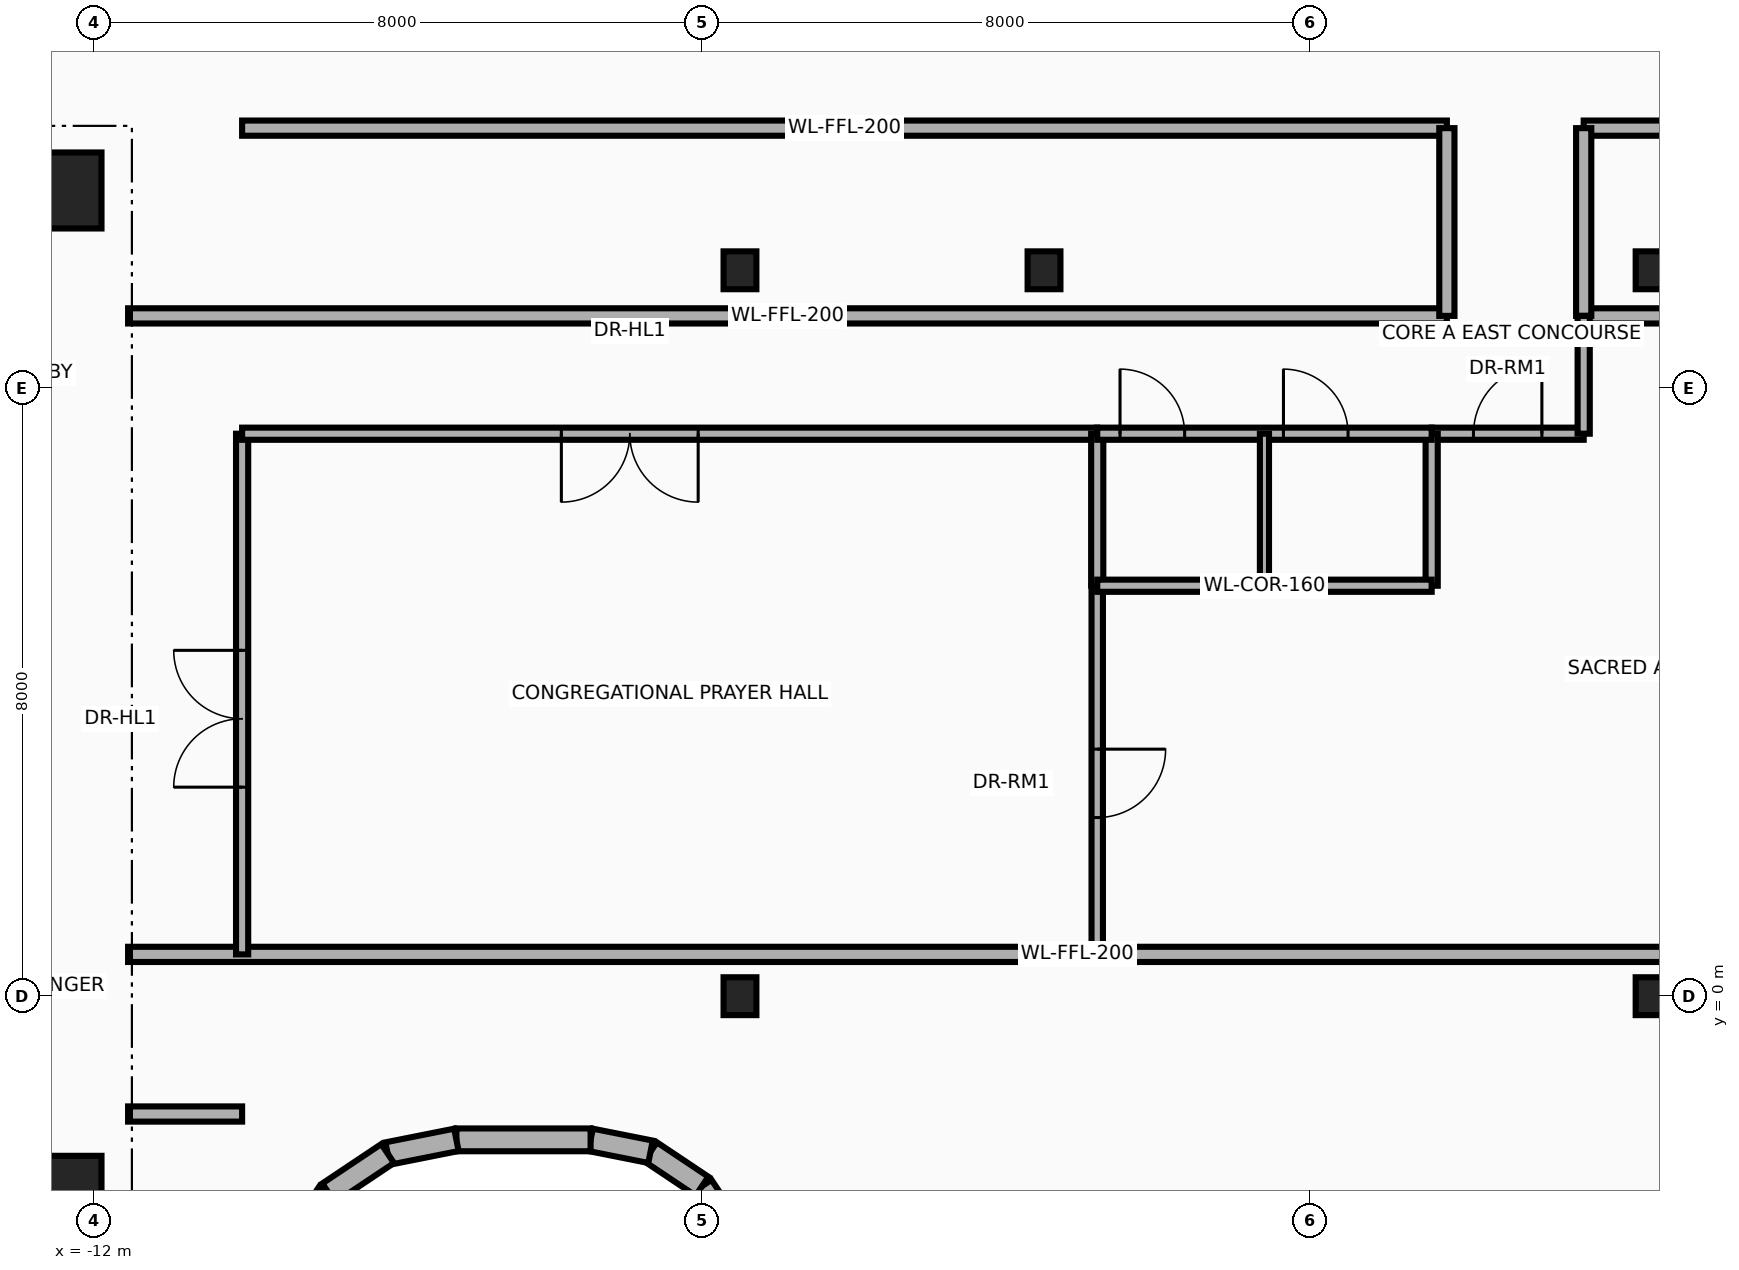
"""IFC4 building model, lengths in metres.
Left out: names, types, materials, properties, quantities, classifications, styles, units other than length and angle.
Written with IfcOpenShell. Run it as: python <this file> out.ifc"""

import sys

from ifc_helpers import new_model, si_unit, direction, frame, frame_2d, origin, origin_2d, place, context, subcontext, project, spatial, rectangle, i_section, extrude, source, transform, mapped, element, fill, save


model = new_model("IFC4")
c1 = context("Model", 3, precision=1e-05, world=origin(), true_north=direction((0.0, 1.0)))
c2 = subcontext(c1, "Body", "Model", "MODEL_VIEW")
j1 = project(units=[si_unit("LENGTHUNIT", "METRE"), si_unit("PLANEANGLEUNIT", "RADIAN")], contexts=[c1])
p1 = place(None, origin())
s1 = spatial("IfcSite", under=j1, at=p1, CompositionType="ELEMENT")
p2 = place(p1, origin())
s2 = spatial("IfcBuilding", under=s1, at=p2, CompositionType="ELEMENT")
p3 = place(p2, frame((0.0, 0.0, 172.3)))
s3 = spatial("IfcBuildingStorey", under=s2, at=p3, CompositionType="ELEMENT", Elevation=172.3)
p4 = place(p3, frame((-22.65, 10.8, 0.0), z_axis=(0.0, 0.0, 1.0), x_axis=(1.0, 0.0, 0.0)))
e1 = element("IfcWall", 1, at=p4, inside=s3, PredefinedType="SHEAR", context=c2, shape_type="SweptSolid", body=[
    extrude(rectangle(XDim=10.25, YDim=0.55, at=frame_2d((5.125, 0.0))), origin(), (0.0, 0.0, 1.0), 3.93),
])
m1 = source(origin(), c2, "Body", "SweptSolid", [
    extrude(rectangle(XDim=1.0, YDim=1.0, at=origin_2d()), origin(), (0.0, 0.0, 1.0), 4.25),
])
for number, where, z_axis, x_axis in (
    (2, (-12.4, -2.6, 0.0), (0.0, 0.0, 1.0), (1.0, 0.0, 0.0)),
    (3, (-12.4, 10.6, 0.0), (0.0, 0.0, 1.0), (1.0, 0.0, 0.0)),
):
    element("IfcColumn", number, at=place(p3, frame(where, z_axis=z_axis, x_axis=x_axis)), inside=s3, PredefinedType="COLUMN", context=c2, shape_type="MappedRepresentation", body=[
        mapped(m1, transform((0.0, 0.0, 0.0), x_axis=(1.0, 0.0, 0.0), y_axis=(0.0, 1.0, 0.0), z_axis=(0.0, 0.0, 1.0), scale=1.0)),
    ])
m2 = source(origin(), c2, "Body", "SweptSolid", [
    extrude(i_section(OverallWidth=0.432, OverallDepth=0.498, WebThickness=0.056, FlangeThickness=0.089, at=origin_2d()), origin(), (0.0, 0.0, 1.0), 4.25),
])
for number, where, z_axis, x_axis in (
    (4, (-3.5, 0.0, 0.0), (0.0, 0.0, 1.0), (1.0, 0.0, 0.0)),
    (5, (-3.5, 9.55, 0.0), (0.0, 0.0, 1.0), (1.0, 0.0, 0.0)),
    (6, (8.5, 0.0, 0.0), (0.0, 0.0, 1.0), (1.0, 0.0, 0.0)),
    (7, (8.5, 9.55, 0.0), (0.0, 0.0, 1.0), (1.0, 0.0, 0.0)),
    (8, (0.5, 9.55, 0.0), (0.0, 0.0, 1.0), (1.0, 0.0, 0.0)),
):
    element("IfcColumn", number, at=place(p3, frame(where, z_axis=z_axis, x_axis=x_axis)), inside=s3, PredefinedType="COLUMN", context=c2, shape_type="MappedRepresentation", body=[
        mapped(m2, transform((0.0, 0.0, 0.0), x_axis=(1.0, 0.0, 0.0), y_axis=(0.0, 1.0, 0.0), z_axis=(0.0, 0.0, 1.0), scale=1.0)),
    ])
p5 = place(p3, frame((8.977, -2.477, 0.0), z_axis=(0.0, 0.0, 1.0), x_axis=(-0.555776307766, -0.831331880615, 0.0)))
e9 = element("IfcWall", 9, at=p5, inside=s3, PredefinedType="SOLIDWALL", context=c2, shape_type="SweptSolid", body=[
    extrude(rectangle(XDim=0.785, YDim=0.3, at=frame_2d((0.393, 0.0))), origin(), (0.0, 0.0, 1.0), 2.915),
])
for number, where, z_axis, x_axis in (
    (10, (-3.547, -3.177, 0.0), (0.0, 0.0, 1.0), (-0.556, 0.831, 0.0)),
    (11, (-4.0, -2.5, 0.0), (0.0, 0.0, 1.0), (-0.831, 0.556, 0.0)),
):
    element("IfcWall", number, at=place(p3, frame(where, z_axis=z_axis, x_axis=x_axis)), inside=s3, PredefinedType="SOLIDWALL", context=c2, shape_type="SweptSolid", body=[
        extrude(rectangle(XDim=0.815, YDim=0.3, at=frame_2d((0.407, 0.0))), origin(), (0.0, 0.0, 1.0), 2.915),
    ])
p6 = place(p3, frame((-4.677, -2.047, 0.0), z_axis=(0.0, 0.0, 1.0), x_axis=(-0.980732291726, 0.195356525272, 0.0)))
e12 = element("IfcWall", 12, at=p6, inside=s3, PredefinedType="SOLIDWALL", context=c2, shape_type="SweptSolid", body=[
    extrude(rectangle(XDim=0.803, YDim=0.3, at=frame_2d((0.402, 0.0))), origin(), (0.0, 0.0, 1.0), 3.93),
])
p7 = place(p3, frame((-5.465, -1.89, 0.0), z_axis=(0.0, 0.0, 1.0), x_axis=(-1.0, 0.0, 0.0)))
e13 = element("IfcWall", 13, at=p7, inside=s3, PredefinedType="SOLIDWALL", context=c2, shape_type="SweptSolid", body=[
    extrude(rectangle(XDim=1.766, YDim=0.3, at=frame_2d((0.883, 0.0))), origin(), (0.0, 0.0, 1.0), 3.93),
])
p8 = place(p3, frame((-7.231, -1.89, 0.0), z_axis=(0.0, 0.0, 1.0), x_axis=(-0.980743190895, -0.195301801101, 0.0)))
e14 = element("IfcWall", 14, at=p8, inside=s3, PredefinedType="SOLIDWALL", context=c2, shape_type="SweptSolid", body=[
    extrude(rectangle(XDim=0.923, YDim=0.3, at=frame_2d((0.461, 0.0))), origin(), (0.0, 0.0, 1.0), 2.715),
])
p9 = place(p3, frame((-8.135, -2.07, 0.0), z_axis=(0.0, 0.0, 1.0), x_axis=(-0.831607331814, -0.555364065883, 0.0)))
e15 = element("IfcWall", 15, at=p9, inside=s3, PredefinedType="SOLIDWALL", context=c2, shape_type="SweptSolid", body=[
    extrude(rectangle(XDim=0.933, YDim=0.3, at=frame_2d((0.467, 0.0))), origin(), (0.0, 0.0, 1.0), 2.715),
])
p10 = place(p3, frame((-8.912, -2.588, 0.0), z_axis=(0.0, 0.0, 1.0), x_axis=(-0.555364065883, -0.831607331814, 0.0)))
e16 = element("IfcWall", 16, at=p10, inside=s3, PredefinedType="SOLIDWALL", context=c2, shape_type="SweptSolid", body=[
    extrude(rectangle(XDim=0.933, YDim=0.3, at=frame_2d((0.467, 0.0))), origin(), (0.0, 0.0, 1.0), 3.93),
])
p11 = place(p3, frame((-11.55, 0.55, 0.0), z_axis=(0.0, 0.0, 1.0), x_axis=(1.0, 0.0, 0.0)))
e17 = element("IfcWall", 17, at=p11, inside=s3, PredefinedType="PARTITIONING", context=c2, shape_type="SweptSolid", body=[
    extrude(rectangle(XDim=24.97, YDim=0.2, at=frame_2d((12.485, 0.0))), origin(), (0.0, 0.0, 1.0), 2.715),
])
p12 = place(p3, frame((-11.55, -1.55, 0.0), z_axis=(0.0, 0.0, 1.0), x_axis=(1.0, 0.0, 0.0)))
e18 = element("IfcWall", 18, at=p12, inside=s3, PredefinedType="PARTITIONING", context=c2, shape_type="SweptSolid", body=[
    extrude(rectangle(XDim=1.5, YDim=0.2, at=frame_2d((0.75, 0.0))), origin(), (0.0, 0.0, 1.0), 2.715),
])
p13 = place(p3, frame((-11.55, 8.95, 0.0), z_axis=(0.0, 0.0, 1.0), x_axis=(1.0, 0.0, 0.0)))
e19 = element("IfcWall", 19, at=p13, inside=s3, PredefinedType="PARTITIONING", context=c2, shape_type="SweptSolid", body=[
    extrude(rectangle(XDim=17.35, YDim=0.2, at=frame_2d((8.675, 0.0))), origin(), (0.0, 0.0, 1.0), 2.715),
])
p14 = place(p3, frame((7.6, 8.95, 0.0), z_axis=(0.0, 0.0, 1.0), x_axis=(1.0, 0.0, 0.0)))
e20 = element("IfcWall", 20, at=p14, inside=s3, PredefinedType="PARTITIONING", context=c2, shape_type="SweptSolid", body=[
    extrude(rectangle(XDim=5.82, YDim=0.2, at=frame_2d((2.91, 0.0))), origin(), (0.0, 0.0, 1.0), 2.715),
])
p15 = place(p3, frame((-10.05, 11.42, 0.0), z_axis=(0.0, 0.0, 1.0), x_axis=(1.0, 0.0, 0.0)))
e21 = element("IfcWall", 21, at=p15, inside=s3, PredefinedType="PARTITIONING", context=c2, shape_type="SweptSolid", body=[
    extrude(rectangle(XDim=15.85, YDim=0.2, at=frame_2d((7.925, 0.0))), origin(), (0.0, 0.0, 1.0), 2.915),
])
p16 = place(p3, frame((7.6, 11.42, 0.0), z_axis=(0.0, 0.0, 1.0), x_axis=(1.0, 0.0, 0.0)))
e22 = element("IfcWall", 22, at=p16, inside=s3, PredefinedType="PARTITIONING", context=c2, shape_type="SweptSolid", body=[
    extrude(rectangle(XDim=5.82, YDim=0.2, at=frame_2d((2.91, 0.0))), origin(), (0.0, 0.0, 1.0), 2.915),
])
for number, where, z_axis, x_axis in (
    (23, (5.8, 8.95, 0.0), (0.0, 0.0, 1.0), (0.0, 1.0, 0.0)),
    (24, (7.6, 8.95, 0.0), (0.0, 0.0, 1.0), (0.0, 1.0, 0.0)),
):
    element("IfcWall", number, at=place(p3, frame(where, z_axis=z_axis, x_axis=x_axis)), inside=s3, PredefinedType="PARTITIONING", context=c2, shape_type="SweptSolid", body=[
        extrude(rectangle(XDim=2.47, YDim=0.2, at=frame_2d((1.235, 0.0))), origin(), (0.0, 0.0, 1.0), 2.715),
    ])
p17 = place(p3, frame((-10.05, 0.55, 0.0), z_axis=(0.0, 0.0, 1.0), x_axis=(0.0, 1.0, 0.0)))
e25 = element("IfcWall", 25, at=p17, inside=s3, PredefinedType="PARTITIONING", context=c2, shape_type="SweptSolid", body=[
    extrude(rectangle(XDim=6.85, YDim=0.16, at=frame_2d((3.425, 0.0))), origin(), (0.0, 0.0, 1.0), 3.93),
])
p18 = place(p17, frame((2.2, 0.0, 0.0)))
e26 = element("IfcOpeningElement", 26, at=p18, cuts=e25, PredefinedType="OPENING", context=c2, shape_type="SweptSolid", body=[
    extrude(rectangle(XDim=1.8, YDim=2.15, at=frame_2d((0.9, 1.075))), frame((0.0, 0.095, 0.0), z_axis=(0.0, -1.0, 0.0), x_axis=(1.0, 0.0, 0.0)), (0.0, 0.0, 1.0), 0.19),
])
p19 = place(p3, frame((-10.05, 7.4, 0.0), z_axis=(0.0, 0.0, 1.0), x_axis=(1.0, 0.0, 0.0)))
e27 = element("IfcWall", 27, at=p19, inside=s3, PredefinedType="PARTITIONING", context=c2, shape_type="SweptSolid", body=[
    extrude(rectangle(XDim=11.25, YDim=0.16, at=frame_2d((5.625, 0.0))), origin(), (0.0, 0.0, 1.0), 2.915),
])
p20 = place(p19, frame((4.2, 0.0, 0.0)))
e28 = element("IfcOpeningElement", 28, at=p20, cuts=e27, PredefinedType="OPENING", context=c2, shape_type="SweptSolid", body=[
    extrude(rectangle(XDim=1.8, YDim=2.15, at=frame_2d((0.9, 1.075))), frame((0.0, 0.095, 0.0), z_axis=(0.0, -1.0, 0.0), x_axis=(1.0, 0.0, 0.0)), (0.0, 0.0, 1.0), 0.19),
])
p21 = place(p3, frame((5.6, 7.4, 0.0), z_axis=(0.0, 0.0, 1.0), x_axis=(1.0, 0.0, 0.0)))
e29 = element("IfcWall", 29, at=p21, inside=s3, PredefinedType="PARTITIONING", context=c2, shape_type="SweptSolid", body=[
    extrude(rectangle(XDim=2.0, YDim=0.16, at=frame_2d((1.0, 0.0))), origin(), (0.0, 0.0, 1.0), 3.93),
])
p22 = place(p21, frame((0.55, 0.0, 0.0)))
e30 = element("IfcOpeningElement", 30, at=p22, cuts=e29, PredefinedType="OPENING", context=c2, shape_type="SweptSolid", body=[
    extrude(rectangle(XDim=0.9, YDim=2.1, at=frame_2d((0.45, 1.05))), frame((0.0, 0.095, 0.0), z_axis=(0.0, -1.0, 0.0), x_axis=(1.0, 0.0, 0.0)), (0.0, 0.0, 1.0), 0.19),
])
p23 = place(p3, frame((7.6, 7.4, 0.0), z_axis=(0.0, 0.0, 1.0), x_axis=(0.0, 1.0, 0.0)))
e31 = element("IfcWall", 31, at=p23, inside=s3, PredefinedType="PARTITIONING", context=c2, shape_type="SweptSolid", body=[
    extrude(rectangle(XDim=1.55, YDim=0.16, at=frame_2d((0.775, 0.0))), origin(), (0.0, 0.0, 1.0), 2.715),
])
p24 = place(p3, frame((1.2, 0.55, 0.0), z_axis=(0.0, 0.0, 1.0), x_axis=(0.0, 1.0, 0.0)))
e32 = element("IfcWall", 32, at=p24, inside=s3, PredefinedType="PARTITIONING", context=c2, shape_type="SweptSolid", body=[
    extrude(rectangle(XDim=4.85, YDim=0.15, at=frame_2d((2.425, 0.0))), origin(), (0.0, 0.0, 1.0), 2.715),
])
p25 = place(p24, frame((1.8, 0.0, 0.0)))
e33 = element("IfcOpeningElement", 33, at=p25, cuts=e32, PredefinedType="OPENING", context=c2, shape_type="SweptSolid", body=[
    extrude(rectangle(XDim=0.9, YDim=2.1, at=frame_2d((0.45, 1.05))), frame((0.0, 0.09, 0.0), z_axis=(0.0, -1.0, 0.0), x_axis=(1.0, 0.0, 0.0)), (0.0, 0.0, 1.0), 0.18),
])
for number, where, z_axis, x_axis in (
    (34, (1.2, 5.4, 0.0), (0.0, 0.0, 1.0), (0.0, 1.0, 0.0)),
    (35, (5.6, 5.4, 0.0), (0.0, 0.0, 1.0), (0.0, 1.0, 0.0)),
):
    element("IfcWall", number, at=place(p3, frame(where, z_axis=z_axis, x_axis=x_axis)), inside=s3, PredefinedType="PARTITIONING", context=c2, shape_type="SweptSolid", body=[
        extrude(rectangle(XDim=2.0, YDim=0.16, at=frame_2d((1.0, 0.0))), origin(), (0.0, 0.0, 1.0), 3.93),
    ])
p26 = place(p3, frame((1.2, 5.4, 0.0), z_axis=(0.0, 0.0, 1.0), x_axis=(1.0, 0.0, 0.0)))
e36 = element("IfcWall", 36, at=p26, inside=s3, PredefinedType="PARTITIONING", context=c2, shape_type="SweptSolid", body=[
    extrude(rectangle(XDim=4.4, YDim=0.16, at=frame_2d((2.2, 0.0))), origin(), (0.0, 0.0, 1.0), 3.93),
])
p27 = place(p3, frame((1.2, 7.4, 0.0), z_axis=(0.0, 0.0, 1.0), x_axis=(1.0, 0.0, 0.0)))
e37 = element("IfcWall", 37, at=p27, inside=s3, PredefinedType="PARTITIONING", context=c2, shape_type="SweptSolid", body=[
    extrude(rectangle(XDim=4.4, YDim=0.16, at=frame_2d((2.2, 0.0))), origin(), (0.0, 0.0, 1.0), 3.93),
])
p28 = place(p27, frame((0.3, 0.0, 0.0)))
e38 = element("IfcOpeningElement", 38, at=p28, cuts=e37, PredefinedType="OPENING", context=c2, shape_type="SweptSolid", body=[
    extrude(rectangle(XDim=0.85, YDim=2.1, at=frame_2d((0.425, 1.05))), frame((0.0, 0.095, 0.0), z_axis=(0.0, -1.0, 0.0), x_axis=(1.0, 0.0, 0.0)), (0.0, 0.0, 1.0), 0.19),
])
p29 = place(p27, frame((2.45, 0.0, 0.0)))
e39 = element("IfcOpeningElement", 39, at=p29, cuts=e37, PredefinedType="OPENING", context=c2, shape_type="SweptSolid", body=[
    extrude(rectangle(XDim=0.85, YDim=2.1, at=frame_2d((0.425, 1.05))), frame((0.0, 0.095, 0.0), z_axis=(0.0, -1.0, 0.0), x_axis=(1.0, 0.0, 0.0)), (0.0, 0.0, 1.0), 0.19),
])
p30 = place(p3, frame((3.4, 5.4, 0.0), z_axis=(0.0, 0.0, 1.0), x_axis=(0.0, 1.0, 0.0)))
e40 = element("IfcWall", 40, at=p30, inside=s3, PredefinedType="PARTITIONING", context=c2, shape_type="SweptSolid", body=[
    extrude(rectangle(XDim=2.0, YDim=0.12, at=frame_2d((1.0, 0.0))), origin(), (0.0, 0.0, 1.0), 3.93),
])
p31 = place(p18, origin())
e41 = element("IfcDoor", 41, at=p31, inside=s3, OperationType="DOUBLE_DOOR_SINGLE_SWING", PredefinedType="DOOR", context=c2, shape_type="SweptSolid", body=[
    extrude(rectangle(XDim=1.8, YDim=2.15, at=frame_2d((0.9, 1.075))), frame((0.0, 0.025, 0.0), z_axis=(0.0, -1.0, 0.0), x_axis=(1.0, 0.0, 0.0)), (0.0, 0.0, 1.0), 0.05),
])
fill(e26, e41)
p32 = place(p20, frame((1.8, 0.0, 0.0), z_axis=(0.0, 0.0, 1.0), x_axis=(-1.0, 0.0, 0.0)))
e42 = element("IfcDoor", 42, at=p32, inside=s3, OperationType="DOUBLE_DOOR_SINGLE_SWING", PredefinedType="DOOR", context=c2, shape_type="SweptSolid", body=[
    extrude(rectangle(XDim=1.8, YDim=2.15, at=frame_2d((0.9, 1.075))), frame((0.0, 0.025, 0.0), z_axis=(0.0, -1.0, 0.0), x_axis=(1.0, 0.0, 0.0)), (0.0, 0.0, 1.0), 0.05),
])
fill(e28, e42)
p33 = place(p22, origin())
e43 = element("IfcDoor", 43, at=p33, inside=s3, OperationType="SINGLE_SWING_RIGHT", PredefinedType="DOOR", context=c2, shape_type="SweptSolid", body=[
    extrude(rectangle(XDim=0.9, YDim=2.1, at=frame_2d((0.45, 1.05))), frame((0.0, 0.025, 0.0), z_axis=(0.0, -1.0, 0.0), x_axis=(1.0, 0.0, 0.0)), (0.0, 0.0, 1.0), 0.05),
])
fill(e30, e43)
p34 = place(p25, frame((0.9, 0.0, 0.0), z_axis=(0.0, 0.0, 1.0), x_axis=(-1.0, 0.0, 0.0)))
e44 = element("IfcDoor", 44, at=p34, inside=s3, OperationType="SINGLE_SWING_LEFT", PredefinedType="DOOR", context=c2, shape_type="SweptSolid", body=[
    extrude(rectangle(XDim=0.9, YDim=2.1, at=frame_2d((0.45, 1.05))), frame((0.0, 0.025, 0.0), z_axis=(0.0, -1.0, 0.0), x_axis=(1.0, 0.0, 0.0)), (0.0, 0.0, 1.0), 0.05),
])
fill(e33, e44)
p35 = place(p28, origin())
e45 = element("IfcDoor", 45, at=p35, inside=s3, OperationType="SINGLE_SWING_RIGHT", PredefinedType="DOOR", context=c2, shape_type="SweptSolid", body=[
    extrude(rectangle(XDim=0.85, YDim=2.1, at=frame_2d((0.425, 1.05))), frame((0.0, 0.025, 0.0), z_axis=(0.0, -1.0, 0.0), x_axis=(1.0, 0.0, 0.0)), (0.0, 0.0, 1.0), 0.05),
])
fill(e38, e45)
p36 = place(p29, origin())
e46 = element("IfcDoor", 46, at=p36, inside=s3, OperationType="SINGLE_SWING_LEFT", PredefinedType="DOOR", context=c2, shape_type="SweptSolid", body=[
    extrude(rectangle(XDim=0.85, YDim=2.1, at=frame_2d((0.425, 1.05))), frame((0.0, 0.025, 0.0), z_axis=(0.0, -1.0, 0.0), x_axis=(1.0, 0.0, 0.0)), (0.0, 0.0, 1.0), 0.05),
])
fill(e39, e46)
save(model, sys.argv[1])
